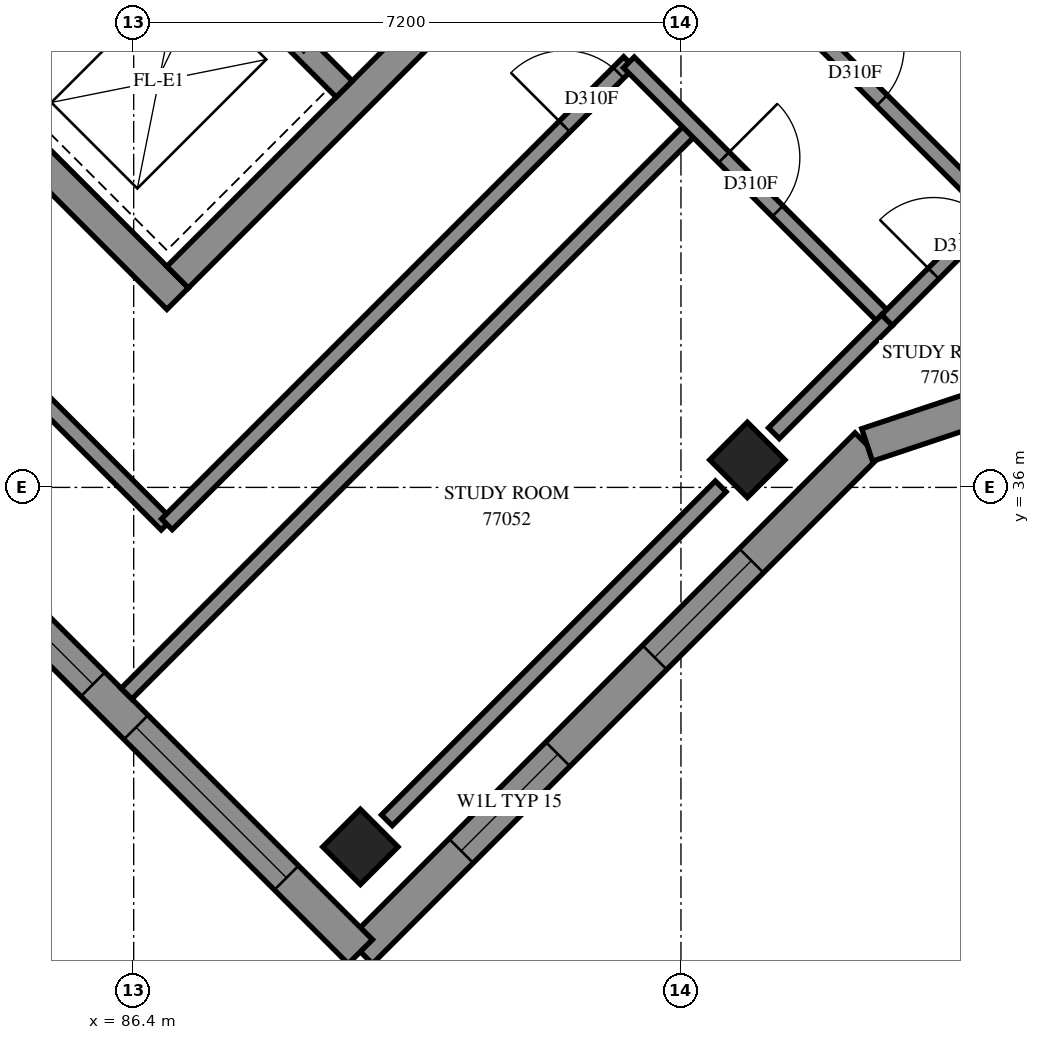
"""IFC4 building model, lengths in metres.
Left out: names, types, materials, properties, quantities, classifications, styles, units other than length and angle.
Written with IfcOpenShell. Run it as: python <this file> out.ifc"""

import sys

from ifc_helpers import new_model, si_unit, direction, frame, frame_2d, origin, origin_2d, place, context, subcontext, project, spatial, polyline, rectangle, outline, extrude, element, fill, save


model = new_model("IFC4")
c1 = context("Model", 3, precision=1e-05, world=origin(), true_north=direction((0.0, 1.0)))
c2 = subcontext(c1, "Body", "Model", "MODEL_VIEW")
j1 = project(units=[si_unit("LENGTHUNIT", "METRE"), si_unit("PLANEANGLEUNIT", "RADIAN")], contexts=[c1])
p1 = place(None, origin())
s1 = spatial("IfcSite", under=j1, at=p1, CompositionType="ELEMENT")
p2 = place(p1, origin())
s2 = spatial("IfcBuilding", under=s1, at=p2, CompositionType="ELEMENT")
p3 = place(p2, frame((0.0, 0.0, 281.2)))
s3 = spatial("IfcBuildingStorey", under=s2, at=p3, CompositionType="ELEMENT", Elevation=281.2)
for number, where, z_axis, x_axis in (
    (1, (94.474, 36.362, 0.0), (0.0, 0.0, 1.0), (0.707, -0.707, 0.0)),
    (2, (89.382, 31.271, 0.0), (0.0, 0.0, 1.0), (0.707, -0.707, 0.0)),
):
    element("IfcColumn", number, at=place(p3, frame(where, z_axis=z_axis, x_axis=x_axis)), inside=s3, PredefinedType="COLUMN", context=c2, shape_type="SweptSolid", body=[
        extrude(rectangle(XDim=0.7, YDim=0.7, at=origin_2d()), origin(), (0.0, 0.0, 1.0), 3.1),
    ])
p4 = place(p3, frame((76.23, 49.231, -0.3), z_axis=(0.0, 0.0, 1.0), x_axis=(0.7071034917, -0.7071100706, 0.0)))
e3 = element("IfcWall", 3, at=p4, inside=s3, PredefinedType="SHEAR", context=c2, shape_type="SweptSolid", body=[
    extrude(rectangle(XDim=15.2, YDim=0.4, at=frame_2d((7.6, 0.0))), origin(), (0.0, 0.0, 1.0), 2.7),
])
p5 = place(p3, frame((86.978, 38.766, -0.3), z_axis=(0.0, 0.0, 1.0), x_axis=(0.7071067812, 0.7071067812, 0.0)))
e4 = element("IfcWall", 4, at=p5, inside=s3, PredefinedType="SHEAR", context=c2, shape_type="SweptSolid", body=[
    extrude(rectangle(XDim=14.4, YDim=0.4, at=frame_2d((7.2, 0.0))), origin(), (0.0, 0.0, 1.0), 2.7),
])
p6 = place(p5, frame((4.55, 0.0, 0.3)))
e5 = element("IfcOpeningElement", 5, at=p6, cuts=e4, PredefinedType="OPENING", context=c2, shape_type="SweptSolid", body=[
    extrude(rectangle(XDim=1.1, YDim=2.1, at=frame_2d((0.55, 1.05))), frame((0.0, 0.21, 0.0), z_axis=(0.0, -1.0, 0.0), x_axis=(1.0, 0.0, 0.0)), (0.0, 0.0, 1.0), 0.42),
])
p7 = place(p5, frame((11.35, 0.0, 0.3)))
e6 = element("IfcOpeningElement", 6, at=p7, cuts=e4, PredefinedType="OPENING", context=c2, shape_type="SweptSolid", body=[
    extrude(rectangle(XDim=1.1, YDim=2.1, at=frame_2d((0.55, 1.05))), frame((0.0, 0.21, 0.0), z_axis=(0.0, -1.0, 0.0), x_axis=(1.0, 0.0, 0.0)), (0.0, 0.0, 1.0), 0.42),
])
p8 = place(p3, frame((84.291, 41.453, 0.0), z_axis=(0.0, 0.0, 1.0), x_axis=(0.7071067812, 0.7071067812, 0.0)))
e7 = element("IfcWall", 7, at=p8, inside=s3, PredefinedType="SOLIDWALL", context=c2, shape_type="SweptSolid", body=[
    extrude(rectangle(XDim=3.3, YDim=0.3, at=frame_2d((1.65, 0.0))), origin(), (0.0, 0.0, 1.0), 3.1),
])
p9 = place(p3, frame((78.988, 51.423, 0.0), z_axis=(0.0, 0.0, 1.0), x_axis=(0.7071067812, -0.7071067812, 0.0)))
e8 = element("IfcWall", 8, at=p9, inside=s3, PredefinedType="SOLIDWALL", context=c2, shape_type="SweptSolid", body=[
    extrude(rectangle(XDim=14.4, YDim=0.3, at=frame_2d((7.2, 0.0))), origin(), (0.0, 0.0, 1.0), 3.1),
])
p10 = place(p9, frame((1.35, 0.0, 0.0)))
e9 = element("IfcOpeningElement", 9, at=p10, cuts=e8, PredefinedType="OPENING", context=c2, shape_type="SweptSolid", body=[
    extrude(rectangle(XDim=0.9, YDim=2.1, at=frame_2d((0.45, 1.05))), frame((0.0, 0.16, 0.0), z_axis=(0.0, -1.0, 0.0), x_axis=(1.0, 0.0, 0.0)), (0.0, 0.0, 1.0), 0.32),
])
p11 = place(p9, frame((4.95, 0.0, 0.0)))
e10 = element("IfcOpeningElement", 10, at=p11, cuts=e8, PredefinedType="OPENING", context=c2, shape_type="SweptSolid", body=[
    extrude(rectangle(XDim=0.9, YDim=2.1, at=frame_2d((0.45, 1.05))), frame((0.0, 0.16, 0.0), z_axis=(0.0, -1.0, 0.0), x_axis=(1.0, 0.0, 0.0)), (0.0, 0.0, 1.0), 0.32),
])
p12 = place(p9, frame((8.55, 0.0, 0.0)))
e11 = element("IfcOpeningElement", 11, at=p12, cuts=e8, PredefinedType="OPENING", context=c2, shape_type="SweptSolid", body=[
    extrude(rectangle(XDim=0.9, YDim=2.1, at=frame_2d((0.45, 1.05))), frame((0.0, 0.16, 0.0), z_axis=(0.0, -1.0, 0.0), x_axis=(1.0, 0.0, 0.0)), (0.0, 0.0, 1.0), 0.32),
])
p13 = place(p9, frame((12.05, 0.0, 0.0)))
e12 = element("IfcOpeningElement", 12, at=p13, cuts=e8, PredefinedType="OPENING", context=c2, shape_type="SweptSolid", body=[
    extrude(rectangle(XDim=1.1, YDim=2.1, at=frame_2d((0.55, 1.05))), frame((0.0, 0.16, 0.0), z_axis=(0.0, -1.0, 0.0), x_axis=(1.0, 0.0, 0.0)), (0.0, 0.0, 1.0), 0.32),
])
p14 = place(p3, frame((89.382, 29.892, 0.0), z_axis=(0.0, 0.0, 1.0), x_axis=(0.7071067812, 0.7071067812, 0.0)))
e13 = element("IfcWall", 13, at=p14, inside=s3, PredefinedType="SOLIDWALL", context=c2, shape_type="SweptSolid", body=[
    extrude(outline(polyline([(-0.225, -0.225), (9.375, -0.225), (9.481, 0.225), (0.225, 0.225), (-0.225, -0.225)])), origin(), (0.0, 0.0, 1.0), 2.6),
])
p15 = place(p14, frame((1.875, 0.0, 0.6)))
e14 = element("IfcOpeningElement", 14, at=p15, cuts=e13, PredefinedType="OPENING", context=c2, shape_type="SweptSolid", body=[
    extrude(rectangle(XDim=1.8, YDim=1.9, at=frame_2d((0.9, 0.95))), frame((0.0, 0.235, 0.0), z_axis=(0.0, -1.0, 0.0), x_axis=(1.0, 0.0, 0.0)), (0.0, 0.0, 1.0), 0.47),
])
p16 = place(p14, frame((5.475, 0.0, 0.6)))
e15 = element("IfcOpeningElement", 15, at=p16, cuts=e13, PredefinedType="OPENING", context=c2, shape_type="SweptSolid", body=[
    extrude(rectangle(XDim=1.8, YDim=1.9, at=frame_2d((0.9, 0.95))), frame((0.0, 0.235, 0.0), z_axis=(0.0, -1.0, 0.0), x_axis=(1.0, 0.0, 0.0)), (0.0, 0.0, 1.0), 0.47),
])
p17 = place(p3, frame((96.049, 36.559, 0.0), z_axis=(0.0, 0.0, 1.0), x_axis=(0.9486870665, 0.3162164604, 0.0)))
e16 = element("IfcWall", 16, at=p17, inside=s3, PredefinedType="SOLIDWALL", context=c2, shape_type="SweptSolid", body=[
    extrude(outline(polyline([(0.053, -0.225), (5.42, -0.225), (5.195, 0.225), (-0.053, 0.225), (0.053, -0.225)])), origin(), (0.0, 0.0, 1.0), 2.6),
])
p18 = place(p17, frame((2.204, 0.0, 0.6)))
e17 = element("IfcOpeningElement", 17, at=p18, cuts=e16, PredefinedType="OPENING", context=c2, shape_type="SweptSolid", body=[
    extrude(rectangle(XDim=1.8, YDim=1.9, at=frame_2d((0.9, 0.95))), frame((0.0, 0.235, 0.0), z_axis=(0.0, -1.0, 0.0), x_axis=(1.0, 0.0, 0.0)), (0.0, 0.0, 1.0), 0.47),
])
p19 = place(p3, frame((78.311, 40.963, 0.0), z_axis=(0.0, 0.0, 1.0), x_axis=(0.7071067812, -0.7071067812, 0.0)))
e18 = element("IfcWall", 18, at=p19, inside=s3, PredefinedType="SOLIDWALL", context=c2, shape_type="SweptSolid", body=[
    extrude(outline(polyline([(0.052, -0.225), (15.882, -0.225), (15.432, 0.225), (-0.052, 0.225), (0.052, -0.225)])), origin(), (0.0, 0.0, 1.0), 3.1),
])
p20 = place(p19, frame((0.641, 0.0, 0.45)))
e19 = element("IfcOpeningElement", 19, at=p20, cuts=e18, PredefinedType="OPENING", context=c2, shape_type="SweptSolid", body=[
    extrude(rectangle(XDim=2.8, YDim=2.55, at=frame_2d((1.4, 1.275))), frame((0.0, 0.235, 0.0), z_axis=(0.0, -1.0, 0.0), x_axis=(1.0, 0.0, 0.0)), (0.0, 0.0, 1.0), 0.47),
])
p21 = place(p19, frame((4.282, 0.0, 0.45)))
e20 = element("IfcOpeningElement", 20, at=p21, cuts=e18, PredefinedType="OPENING", context=c2, shape_type="SweptSolid", body=[
    extrude(rectangle(XDim=2.8, YDim=2.55, at=frame_2d((1.4, 1.275))), frame((0.0, 0.235, 0.0), z_axis=(0.0, -1.0, 0.0), x_axis=(1.0, 0.0, 0.0)), (0.0, 0.0, 1.0), 0.47),
])
p22 = place(p19, frame((7.882, 0.0, 0.45)))
e21 = element("IfcOpeningElement", 21, at=p22, cuts=e18, PredefinedType="OPENING", context=c2, shape_type="SweptSolid", body=[
    extrude(rectangle(XDim=2.8, YDim=2.55, at=frame_2d((1.4, 1.275))), frame((0.0, 0.235, 0.0), z_axis=(0.0, -1.0, 0.0), x_axis=(1.0, 0.0, 0.0)), (0.0, 0.0, 1.0), 0.47),
])
p23 = place(p19, frame((11.482, 0.0, 0.45)))
e22 = element("IfcOpeningElement", 22, at=p23, cuts=e18, PredefinedType="OPENING", context=c2, shape_type="SweptSolid", body=[
    extrude(rectangle(XDim=2.8, YDim=2.55, at=frame_2d((1.4, 1.275))), frame((0.0, 0.235, 0.0), z_axis=(0.0, -1.0, 0.0), x_axis=(1.0, 0.0, 0.0)), (0.0, 0.0, 1.0), 0.47),
])
p24 = place(p3, frame((86.306, 33.287, 0.0), z_axis=(0.0, 0.0, 1.0), x_axis=(0.7071020418, 0.7071115206, 0.0)))
e23 = element("IfcWall", 23, at=p24, inside=s3, PredefinedType="PARTITIONING", context=c2, shape_type="SweptSolid", body=[
    extrude(rectangle(XDim=10.55, YDim=0.2, at=frame_2d((5.275, 0.0))), origin(), (0.0, 0.0, 1.0), 3.1),
])
p25 = place(p3, frame((80.747, 41.597, 0.0), z_axis=(0.0, 0.0, 1.0), x_axis=(0.7071067812, -0.7071067812, 0.0)))
e24 = element("IfcWall", 24, at=p25, inside=s3, PredefinedType="PARTITIONING", context=c2, shape_type="SweptSolid", body=[
    extrude(rectangle(XDim=8.607, YDim=0.2, at=frame_2d((4.303, 0.0))), origin(), (0.0, 0.0, 1.0), 3.1),
])
p26 = place(p3, frame((86.837, 35.515, 0.0), z_axis=(0.0, 0.0, 1.0), x_axis=(0.7071067812, 0.7071067812, 0.0)))
e25 = element("IfcWall", 25, at=p26, inside=s3, PredefinedType="PARTITIONING", context=c2, shape_type="SweptSolid", body=[
    extrude(rectangle(XDim=8.598, YDim=0.2, at=frame_2d((4.299, 0.0))), origin(), (0.0, 0.0, 1.0), 3.1),
])
p27 = place(p26, frame((7.4, 0.0, 0.0)))
e26 = element("IfcOpeningElement", 26, at=p27, cuts=e25, PredefinedType="OPENING", context=c2, shape_type="SweptSolid", body=[
    extrude(rectangle(XDim=1.0, YDim=2.1, at=frame_2d((0.5, 1.05))), frame((0.0, 0.11, 0.0), z_axis=(0.0, -1.0, 0.0), x_axis=(1.0, 0.0, 0.0)), (0.0, 0.0, 1.0), 0.22),
])
p28 = place(p3, frame((89.731, 31.621, 0.0), z_axis=(0.0, 0.0, 1.0), x_axis=(0.7071067812, 0.7071067812, 0.0)))
e27 = element("IfcWall", 27, at=p28, inside=s3, PredefinedType="PARTITIONING", context=c2, shape_type="SweptSolid", body=[
    extrude(rectangle(XDim=6.211, YDim=0.2, at=frame_2d((3.106, 0.0))), origin(), (0.0, 0.0, 1.0), 2.6),
])
p29 = place(p3, frame((92.915, 41.591, 0.0), z_axis=(0.0, 0.0, 1.0), x_axis=(0.7071067812, -0.7071067812, 0.0)))
e28 = element("IfcWall", 28, at=p29, inside=s3, PredefinedType="PARTITIONING", context=c2, shape_type="SweptSolid", body=[
    extrude(rectangle(XDim=4.8, YDim=0.2, at=frame_2d((2.4, 0.0))), origin(), (0.0, 0.0, 1.0), 3.1),
])
p30 = place(p29, frame((1.767, 0.0, 0.0)))
e29 = element("IfcOpeningElement", 29, at=p30, cuts=e28, PredefinedType="OPENING", context=c2, shape_type="SweptSolid", body=[
    extrude(rectangle(XDim=1.0, YDim=2.1, at=frame_2d((0.5, 1.05))), frame((0.0, 0.11, 0.0), z_axis=(0.0, -1.0, 0.0), x_axis=(1.0, 0.0, 0.0)), (0.0, 0.0, 1.0), 0.22),
])
p31 = place(p3, frame((94.329, 43.005, 0.0), z_axis=(0.0, 0.0, 1.0), x_axis=(0.7071067812, -0.7071067812, 0.0)))
e30 = element("IfcWall", 30, at=p31, inside=s3, PredefinedType="PARTITIONING", context=c2, shape_type="SweptSolid", body=[
    extrude(rectangle(XDim=4.8, YDim=0.2, at=frame_2d((2.4, 0.0))), origin(), (0.0, 0.0, 1.0), 3.1),
])
p32 = place(p31, frame((1.707, 0.0, 0.0)))
e31 = element("IfcOpeningElement", 31, at=p32, cuts=e30, PredefinedType="OPENING", context=c2, shape_type="SweptSolid", body=[
    extrude(rectangle(XDim=1.0, YDim=2.1, at=frame_2d((0.5, 1.05))), frame((0.0, 0.11, 0.0), z_axis=(0.0, -1.0, 0.0), x_axis=(1.0, 0.0, 0.0)), (0.0, 0.0, 1.0), 0.22),
])
p33 = place(p3, frame((94.823, 36.713, 0.0), z_axis=(0.0, 0.0, 1.0), x_axis=(0.7071067812, 0.7071067812, 0.0)))
e32 = element("IfcWall", 32, at=p33, inside=s3, PredefinedType="PARTITIONING", context=c2, shape_type="SweptSolid", body=[
    extrude(rectangle(XDim=2.104, YDim=0.2, at=frame_2d((1.052, 0.0))), origin(), (0.0, 0.0, 1.0), 2.6),
])
p34 = place(p3, frame((96.311, 38.201, 0.0), z_axis=(0.0, 0.0, 1.0), x_axis=(0.7071067812, 0.7071067812, 0.0)))
e33 = element("IfcWall", 33, at=p34, inside=s3, PredefinedType="PARTITIONING", context=c2, shape_type="SweptSolid", body=[
    extrude(rectangle(XDim=2.0, YDim=0.2, at=frame_2d((1.0, 0.0))), origin(), (0.0, 0.0, 1.0), 2.6),
])
p35 = place(p34, frame((0.866, 0.0, 0.0)))
e34 = element("IfcOpeningElement", 34, at=p35, cuts=e33, PredefinedType="OPENING", context=c2, shape_type="SweptSolid", body=[
    extrude(rectangle(XDim=1.0, YDim=2.1, at=frame_2d((0.5, 1.05))), frame((0.0, 0.11, 0.0), z_axis=(0.0, -1.0, 0.0), x_axis=(1.0, 0.0, 0.0)), (0.0, 0.0, 1.0), 0.22),
])
p36 = place(p15, origin())
e35 = element("IfcWindow", 35, at=p36, inside=s3, PartitioningType="SINGLE_PANEL", PredefinedType="WINDOW", context=c2, shape_type="SweptSolid", body=[
    extrude(rectangle(XDim=1.8, YDim=1.9, at=frame_2d((0.9, 0.95))), frame((0.0, 0.205, 0.0), z_axis=(0.0, -1.0, 0.0), x_axis=(1.0, 0.0, 0.0)), (0.0, 0.0, 1.0), 0.06),
])
fill(e14, e35)
p37 = place(p16, origin())
e36 = element("IfcWindow", 36, at=p37, inside=s3, PartitioningType="SINGLE_PANEL", PredefinedType="WINDOW", context=c2, shape_type="SweptSolid", body=[
    extrude(rectangle(XDim=1.8, YDim=1.9, at=frame_2d((0.9, 0.95))), frame((0.0, 0.205, 0.0), z_axis=(0.0, -1.0, 0.0), x_axis=(1.0, 0.0, 0.0)), (0.0, 0.0, 1.0), 0.06),
])
fill(e15, e36)
p38 = place(p22, origin())
e37 = element("IfcWindow", 37, at=p38, inside=s3, PartitioningType="SINGLE_PANEL", PredefinedType="WINDOW", context=c2, shape_type="SweptSolid", body=[
    extrude(rectangle(XDim=2.8, YDim=2.55, at=frame_2d((1.4, 1.275))), frame((0.0, 0.205, 0.0), z_axis=(0.0, -1.0, 0.0), x_axis=(1.0, 0.0, 0.0)), (0.0, 0.0, 1.0), 0.06),
])
fill(e21, e37)
p39 = place(p23, origin())
e38 = element("IfcWindow", 38, at=p39, inside=s3, PartitioningType="SINGLE_PANEL", PredefinedType="WINDOW", context=c2, shape_type="SweptSolid", body=[
    extrude(rectangle(XDim=2.8, YDim=2.55, at=frame_2d((1.4, 1.275))), frame((0.0, 0.205, 0.0), z_axis=(0.0, -1.0, 0.0), x_axis=(1.0, 0.0, 0.0)), (0.0, 0.0, 1.0), 0.06),
])
fill(e22, e38)
p40 = place(p27, origin())
e39 = element("IfcDoor", 39, at=p40, inside=s3, OperationType="SINGLE_SWING_LEFT", PredefinedType="DOOR", context=c2, shape_type="SweptSolid", body=[
    extrude(rectangle(XDim=1.0, YDim=2.1, at=frame_2d((0.5, 1.05))), frame((0.0, 0.025, 0.0), z_axis=(0.0, -1.0, 0.0), x_axis=(1.0, 0.0, 0.0)), (0.0, 0.0, 1.0), 0.05),
])
fill(e26, e39)
p41 = place(p32, origin())
e40 = element("IfcDoor", 40, at=p41, inside=s3, OperationType="SINGLE_SWING_RIGHT", PredefinedType="DOOR", context=c2, shape_type="SweptSolid", body=[
    extrude(rectangle(XDim=1.0, YDim=2.1, at=frame_2d((0.5, 1.05))), frame((0.0, 0.025, 0.0), z_axis=(0.0, -1.0, 0.0), x_axis=(1.0, 0.0, 0.0)), (0.0, 0.0, 1.0), 0.05),
])
fill(e31, e40)
p42 = place(p30, origin())
e41 = element("IfcDoor", 41, at=p42, inside=s3, OperationType="SINGLE_SWING_LEFT", PredefinedType="DOOR", context=c2, shape_type="SweptSolid", body=[
    extrude(rectangle(XDim=1.0, YDim=2.1, at=frame_2d((0.5, 1.05))), frame((0.0, 0.025, 0.0), z_axis=(0.0, -1.0, 0.0), x_axis=(1.0, 0.0, 0.0)), (0.0, 0.0, 1.0), 0.05),
])
fill(e29, e41)
p43 = place(p35, origin())
e42 = element("IfcDoor", 42, at=p43, inside=s3, OperationType="SINGLE_SWING_RIGHT", PredefinedType="DOOR", context=c2, shape_type="SweptSolid", body=[
    extrude(rectangle(XDim=1.0, YDim=2.1, at=frame_2d((0.5, 1.05))), frame((0.0, 0.025, 0.0), z_axis=(0.0, -1.0, 0.0), x_axis=(1.0, 0.0, 0.0)), (0.0, 0.0, 1.0), 0.05),
])
fill(e34, e42)
save(model, sys.argv[1])
